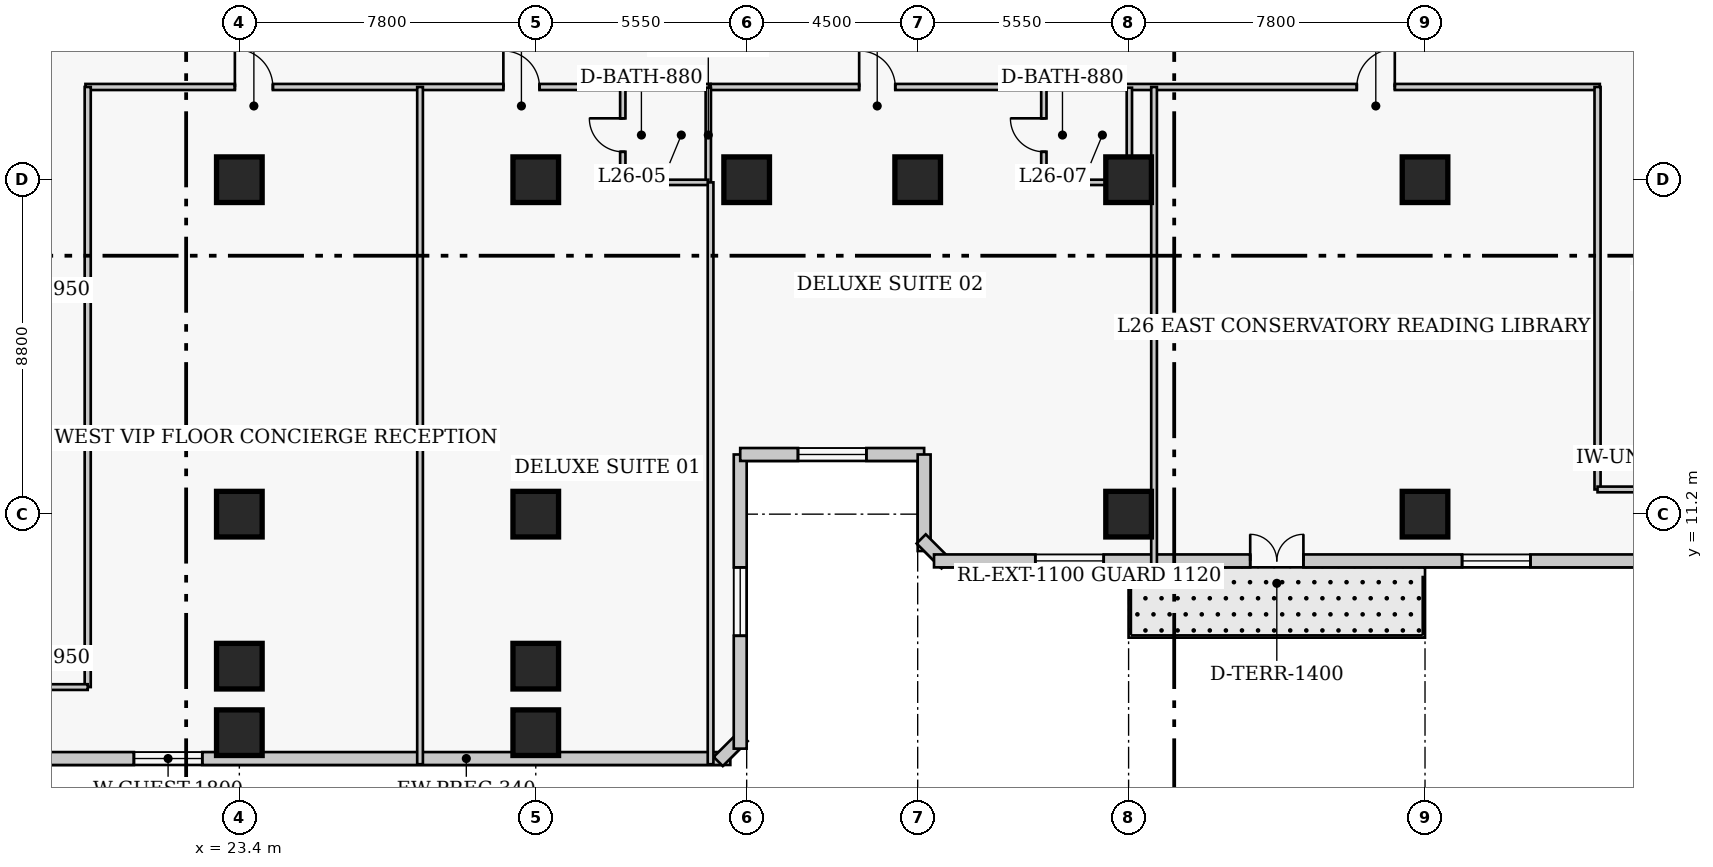
"""IFC4 building model, lengths in metres.
Left out: names, types, materials, properties, quantities, classifications, styles, units other than length and angle.
Written with IfcOpenShell. Run it as: python <this file> out.ifc"""

import sys

from ifc_helpers import new_model, si_unit, direction, frame, frame_2d, origin, origin_2d, place, context, subcontext, project, spatial, rectangle, extrude, element, fill, save


model = new_model("IFC4")
c1 = context("Model", 3, precision=1e-05, world=origin(), true_north=direction((0.0, 1.0)))
c2 = subcontext(c1, "Body", "Model", "MODEL_VIEW")
j1 = project(units=[si_unit("LENGTHUNIT", "METRE"), si_unit("PLANEANGLEUNIT", "RADIAN")], contexts=[c1])
p1 = place(None, origin())
s1 = spatial("IfcSite", under=j1, at=p1, CompositionType="ELEMENT")
p2 = place(p1, origin())
s2 = spatial("IfcBuilding", under=s1, at=p2, CompositionType="ELEMENT")
p3 = place(p2, frame((0.0, 0.0, 107.0)))
s3 = spatial("IfcBuildingStorey", under=s2, at=p3, CompositionType="ELEMENT", Elevation=107.0)
for number, where, z_axis, x_axis in (
    (1, (23.4, 11.2, 0.0), (0.0, 0.0, 1.0), (1.0, 0.0, 0.0)),
    (2, (23.4, 20.0, 0.0), (0.0, 0.0, 1.0), (1.0, 0.0, 0.0)),
    (3, (31.2, 11.2, 0.0), (0.0, 0.0, 1.0), (1.0, 0.0, 0.0)),
    (4, (31.2, 20.0, 0.0), (0.0, 0.0, 1.0), (1.0, 0.0, 0.0)),
    (5, (36.75, 20.0, 0.0), (0.0, 0.0, 1.0), (1.0, 0.0, 0.0)),
    (6, (41.25, 20.0, 0.0), (0.0, 0.0, 1.0), (1.0, 0.0, 0.0)),
    (7, (46.8, 11.2, 0.0), (0.0, 0.0, 1.0), (1.0, 0.0, 0.0)),
    (8, (46.8, 20.0, 0.0), (0.0, 0.0, 1.0), (1.0, 0.0, 0.0)),
    (9, (54.6, 11.2, 0.0), (0.0, 0.0, 1.0), (1.0, 0.0, 0.0)),
    (10, (54.6, 20.0, 0.0), (0.0, 0.0, 1.0), (1.0, 0.0, 0.0)),
    (11, (23.4, 7.2, 0.0), (0.0, 0.0, 1.0), (1.0, 0.0, 0.0)),
    (12, (31.2, 7.2, 0.0), (0.0, 0.0, 1.0), (1.0, 0.0, 0.0)),
    (13, (23.4, 5.45, 0.0), (0.0, 0.0, 1.0), (1.0, 0.0, 0.0)),
    (14, (31.2, 5.45, 0.0), (0.0, 0.0, 1.0), (1.0, 0.0, 0.0)),
):
    element("IfcColumn", number, at=place(p3, frame(where, z_axis=z_axis, x_axis=x_axis)), inside=s3, PredefinedType="COLUMN", context=c2, shape_type="SweptSolid", body=[
        extrude(rectangle(XDim=1.2, YDim=1.2, at=origin_2d()), origin(), (0.0, 0.0, 1.0), 3.8),
    ])
p4 = place(p3, frame((8.03, 4.77, 0.0), z_axis=(0.0, 0.0, 1.0), x_axis=(1.0, 0.0, 0.0)))
e15 = element("IfcWall", 15, at=p4, inside=s3, PredefinedType="SOLIDWALL", context=c2, shape_type="SweptSolid", body=[
    extrude(rectangle(XDim=28.29, YDim=0.34, at=frame_2d((14.145, 0.0))), origin(), (0.0, 0.0, 1.0), 3.54),
])
p5 = place(p4, frame((12.595, 0.0, 0.85)))
e16 = element("IfcOpeningElement", 16, at=p5, cuts=e15, PredefinedType="OPENING", context=c2, shape_type="SweptSolid", body=[
    extrude(rectangle(XDim=1.8, YDim=1.8, at=frame_2d((0.9, 0.9))), frame((0.0, 0.18, 0.0), z_axis=(0.0, -1.0, 0.0), x_axis=(1.0, 0.0, 0.0)), (0.0, 0.0, 1.0), 0.36),
])
p6 = place(p3, frame((36.001, 4.692, 0.0), z_axis=(0.0, 0.0, 1.0), x_axis=(0.707238225886, 0.706975312048, 0.0)))
e17 = element("IfcWall", 17, at=p6, inside=s3, PredefinedType="SOLIDWALL", context=c2, shape_type="SweptSolid", body=[
    extrude(rectangle(XDim=0.929, YDim=0.34, at=frame_2d((0.464, 0.0))), origin(), (0.0, 0.0, 1.0), 3.54),
])
p7 = place(p3, frame((36.58, 5.03, 0.0), z_axis=(0.0, 0.0, 1.0), x_axis=(0.0, 1.0, 0.0)))
e18 = element("IfcWall", 18, at=p7, inside=s3, PredefinedType="SOLIDWALL", context=c2, shape_type="SweptSolid", body=[
    extrude(rectangle(XDim=7.74, YDim=0.34, at=frame_2d((3.87, 0.0))), origin(), (0.0, 0.0, 1.0), 3.54),
])
p8 = place(p7, frame((2.97, 0.0, 0.85)))
e19 = element("IfcOpeningElement", 19, at=p8, cuts=e18, PredefinedType="OPENING", context=c2, shape_type="SweptSolid", body=[
    extrude(rectangle(XDim=1.8, YDim=1.8, at=frame_2d((0.9, 0.9))), frame((0.0, 0.18, 0.0), z_axis=(0.0, -1.0, 0.0), x_axis=(1.0, 0.0, 0.0)), (0.0, 0.0, 1.0), 0.36),
])
p9 = place(p3, frame((36.58, 12.77, 0.0), z_axis=(0.0, 0.0, 1.0), x_axis=(1.0, 0.0, 0.0)))
e20 = element("IfcWall", 20, at=p9, inside=s3, PredefinedType="SOLIDWALL", context=c2, shape_type="SweptSolid", body=[
    extrude(rectangle(XDim=4.84, YDim=0.34, at=frame_2d((2.42, 0.0))), origin(), (0.0, 0.0, 1.0), 3.54),
])
p10 = place(p9, frame((1.52, 0.0, 0.85)))
e21 = element("IfcOpeningElement", 21, at=p10, cuts=e20, PredefinedType="OPENING", context=c2, shape_type="SweptSolid", body=[
    extrude(rectangle(XDim=1.8, YDim=1.8, at=frame_2d((0.9, 0.9))), frame((0.0, 0.18, 0.0), z_axis=(0.0, -1.0, 0.0), x_axis=(1.0, 0.0, 0.0)), (0.0, 0.0, 1.0), 0.36),
])
p11 = place(p3, frame((41.42, 12.77, 0.0), z_axis=(0.0, 0.0, 1.0), x_axis=(0.0, -1.0, 0.0)))
e22 = element("IfcWall", 22, at=p11, inside=s3, PredefinedType="SOLIDWALL", context=c2, shape_type="SweptSolid", body=[
    extrude(rectangle(XDim=2.54, YDim=0.34, at=frame_2d((1.27, 0.0))), origin(), (0.0, 0.0, 1.0), 3.54),
])
p12 = place(p3, frame((41.342, 10.549, 0.0), z_axis=(0.0, 0.0, 1.0), x_axis=(0.707106781187, -0.707106781187, 0.0)))
e23 = element("IfcWall", 23, at=p12, inside=s3, PredefinedType="SOLIDWALL", context=c2, shape_type="SweptSolid", body=[
    extrude(rectangle(XDim=0.929, YDim=0.34, at=frame_2d((0.464, 0.0))), origin(), (0.0, 0.0, 1.0), 3.54),
])
p13 = place(p3, frame((41.68, 9.97, 0.0), z_axis=(0.0, 0.0, 1.0), x_axis=(1.0, 0.0, 0.0)))
e24 = element("IfcWall", 24, at=p13, inside=s3, PredefinedType="SOLIDWALL", context=c2, shape_type="SweptSolid", body=[
    extrude(rectangle(XDim=28.29, YDim=0.34, at=frame_2d((14.145, 0.0))), origin(), (0.0, 0.0, 1.0), 3.54),
])
p14 = place(p13, frame((8.32, 0.0, 0.0)))
e25 = element("IfcOpeningElement", 25, at=p14, cuts=e24, PredefinedType="OPENING", context=c2, shape_type="SweptSolid", body=[
    extrude(rectangle(XDim=1.4, YDim=2.15, at=frame_2d((0.7, 1.075))), frame((0.0, 0.18, 0.0), z_axis=(0.0, -1.0, 0.0), x_axis=(1.0, 0.0, 0.0)), (0.0, 0.0, 1.0), 0.36),
])
p15 = place(p13, frame((2.665, 0.0, 0.85)))
e26 = element("IfcOpeningElement", 26, at=p15, cuts=e24, PredefinedType="OPENING", context=c2, shape_type="SweptSolid", body=[
    extrude(rectangle(XDim=1.8, YDim=1.8, at=frame_2d((0.9, 0.9))), frame((0.0, 0.18, 0.0), z_axis=(0.0, -1.0, 0.0), x_axis=(1.0, 0.0, 0.0)), (0.0, 0.0, 1.0), 0.36),
])
p16 = place(p13, frame((13.895, 0.0, 0.85)))
e27 = element("IfcOpeningElement", 27, at=p16, cuts=e24, PredefinedType="OPENING", context=c2, shape_type="SweptSolid", body=[
    extrude(rectangle(XDim=1.8, YDim=1.8, at=frame_2d((0.9, 0.9))), frame((0.0, 0.18, 0.0), z_axis=(0.0, -1.0, 0.0), x_axis=(1.0, 0.0, 0.0)), (0.0, 0.0, 1.0), 0.36),
])
p17 = place(p3, frame((19.35, 22.44, 0.0), z_axis=(0.0, 0.0, 1.0), x_axis=(1.0, 0.0, 0.0)))
e28 = element("IfcWall", 28, at=p17, inside=s3, PredefinedType="PARTITIONING", context=c2, shape_type="SweptSolid", body=[
    extrude(rectangle(XDim=16.45, YDim=0.16, at=frame_2d((8.225, 0.0))), origin(), (0.0, 0.0, 1.0), 3.54),
])
p18 = place(p17, frame((3.933, 0.0, 0.0)))
e29 = element("IfcOpeningElement", 29, at=p18, cuts=e28, PredefinedType="OPENING", context=c2, shape_type="SweptSolid", body=[
    extrude(rectangle(XDim=1.0, YDim=2.15, at=frame_2d((0.5, 1.075))), frame((0.0, 0.09, 0.0), z_axis=(0.0, -1.0, 0.0), x_axis=(1.0, 0.0, 0.0)), (0.0, 0.0, 1.0), 0.18),
])
p19 = place(p17, frame((10.998, 0.0, 0.0)))
e30 = element("IfcOpeningElement", 30, at=p19, cuts=e28, PredefinedType="OPENING", context=c2, shape_type="SweptSolid", body=[
    extrude(rectangle(XDim=0.95, YDim=2.1, at=frame_2d((0.475, 1.05))), frame((0.0, 0.09, 0.0), z_axis=(0.0, -1.0, 0.0), x_axis=(1.0, 0.0, 0.0)), (0.0, 0.0, 1.0), 0.18),
])
p20 = place(p3, frame((35.8, 22.44, 0.0), z_axis=(0.0, 0.0, 1.0), x_axis=(1.0, 0.0, 0.0)))
e31 = element("IfcWall", 31, at=p20, inside=s3, PredefinedType="PARTITIONING", context=c2, shape_type="SweptSolid", body=[
    extrude(rectangle(XDim=23.4, YDim=0.16, at=frame_2d((11.7, 0.0))), origin(), (0.0, 0.0, 1.0), 3.54),
])
p21 = place(p20, frame((3.91, 0.0, 0.0)))
e32 = element("IfcOpeningElement", 32, at=p21, cuts=e31, PredefinedType="OPENING", context=c2, shape_type="SweptSolid", body=[
    extrude(rectangle(XDim=0.95, YDim=2.1, at=frame_2d((0.475, 1.05))), frame((0.0, 0.09, 0.0), z_axis=(0.0, -1.0, 0.0), x_axis=(1.0, 0.0, 0.0)), (0.0, 0.0, 1.0), 0.18),
])
p22 = place(p20, frame((17.005, 0.0, 0.0)))
e33 = element("IfcOpeningElement", 33, at=p22, cuts=e31, PredefinedType="OPENING", context=c2, shape_type="SweptSolid", body=[
    extrude(rectangle(XDim=1.0, YDim=2.15, at=frame_2d((0.5, 1.075))), frame((0.0, 0.09, 0.0), z_axis=(0.0, -1.0, 0.0), x_axis=(1.0, 0.0, 0.0)), (0.0, 0.0, 1.0), 0.18),
])
p23 = place(p3, frame((19.41, 6.65, 0.0), z_axis=(0.0, 0.0, 1.0), x_axis=(0.0, 1.0, 0.0)))
e34 = element("IfcWall", 34, at=p23, inside=s3, PredefinedType="PARTITIONING", context=c2, shape_type="SweptSolid", body=[
    extrude(rectangle(XDim=15.79, YDim=0.16, at=frame_2d((7.895, 0.0))), origin(), (0.0, 0.0, 1.0), 3.083),
])
p24 = place(p3, frame((59.14, 11.85, 0.0), z_axis=(0.0, 0.0, 1.0), x_axis=(0.0, 1.0, 0.0)))
e35 = element("IfcWall", 35, at=p24, inside=s3, PredefinedType="PARTITIONING", context=c2, shape_type="SweptSolid", body=[
    extrude(rectangle(XDim=10.59, YDim=0.16, at=frame_2d((5.295, 0.0))), origin(), (0.0, 0.0, 1.0), 3.54),
])
p25 = place(p3, frame((59.14, 11.85, 0.0), z_axis=(0.0, 0.0, 1.0), x_axis=(1.0, 0.0, 0.0)))
e36 = element("IfcWall", 36, at=p25, inside=s3, PredefinedType="PARTITIONING", context=c2, shape_type="SweptSolid", body=[
    extrude(rectangle(XDim=2.22, YDim=0.15, at=frame_2d((1.11, 0.0))), origin(), (0.0, 0.0, 1.0), 3.54),
])
p26 = place(p3, frame((17.19, 6.65, 0.0), z_axis=(0.0, 0.0, 1.0), x_axis=(1.0, 0.0, 0.0)))
e37 = element("IfcWall", 37, at=p26, inside=s3, PredefinedType="PARTITIONING", context=c2, shape_type="SweptSolid", body=[
    extrude(rectangle(XDim=2.22, YDim=0.15, at=frame_2d((1.11, 0.0))), origin(), (0.0, 0.0, 1.0), 3.54),
])
p27 = place(p3, frame((28.155, 4.62, 0.0), z_axis=(0.0, 0.0, 1.0), x_axis=(0.0, 1.0, 0.0)))
e38 = element("IfcWall", 38, at=p27, inside=s3, PredefinedType="PARTITIONING", context=c2, shape_type="SweptSolid", body=[
    extrude(rectangle(XDim=17.82, YDim=0.15, at=frame_2d((8.91, 0.0))), origin(), (0.0, 0.0, 1.0), 3.54),
])
p28 = place(p3, frame((33.49, 19.93, 0.0), z_axis=(0.0, 0.0, 1.0), x_axis=(0.0, 1.0, 0.0)))
e39 = element("IfcWall", 39, at=p28, inside=s3, PredefinedType="PLUMBINGWALL", context=c2, shape_type="SweptSolid", body=[
    extrude(rectangle(XDim=2.49, YDim=0.14, at=frame_2d((1.245, 0.0))), origin(), (0.0, 0.0, 1.0), 3.54),
])
p29 = place(p28, frame((0.805, 0.0, 0.0)))
e40 = element("IfcOpeningElement", 40, at=p29, cuts=e39, PredefinedType="OPENING", context=c2, shape_type="SweptSolid", body=[
    extrude(rectangle(XDim=0.88, YDim=2.05, at=frame_2d((0.44, 1.025))), frame((0.0, 0.08, 0.0), z_axis=(0.0, -1.0, 0.0), x_axis=(1.0, 0.0, 0.0)), (0.0, 0.0, 1.0), 0.16),
])
p30 = place(p3, frame((35.74, 19.93, 0.0), z_axis=(0.0, 0.0, 1.0), x_axis=(0.0, 1.0, 0.0)))
e41 = element("IfcWall", 41, at=p30, inside=s3, PredefinedType="PLUMBINGWALL", context=c2, shape_type="SweptSolid", body=[
    extrude(rectangle(XDim=2.49, YDim=0.14, at=frame_2d((1.245, 0.0))), origin(), (0.0, 0.0, 1.0), 3.54),
])
p31 = place(p3, frame((33.49, 19.93, 0.0), z_axis=(0.0, 0.0, 1.0), x_axis=(1.0, 0.0, 0.0)))
e42 = element("IfcWall", 42, at=p31, inside=s3, PredefinedType="PLUMBINGWALL", context=c2, shape_type="SweptSolid", body=[
    extrude(rectangle(XDim=2.25, YDim=0.14, at=frame_2d((1.125, 0.0))), origin(), (0.0, 0.0, 1.0), 2.679),
])
p32 = place(p3, frame((35.8, 4.62, 0.0), z_axis=(0.0, 0.0, 1.0), x_axis=(0.0, 1.0, 0.0)))
e43 = element("IfcWall", 43, at=p32, inside=s3, PredefinedType="PARTITIONING", context=c2, shape_type="SweptSolid", body=[
    extrude(rectangle(XDim=15.31, YDim=0.15, at=frame_2d((7.655, 0.0))), origin(), (0.0, 0.0, 1.0), 3.54),
])
p33 = place(p3, frame((44.57, 19.93, 0.0), z_axis=(0.0, 0.0, 1.0), x_axis=(0.0, 1.0, 0.0)))
e44 = element("IfcWall", 44, at=p33, inside=s3, PredefinedType="PLUMBINGWALL", context=c2, shape_type="SweptSolid", body=[
    extrude(rectangle(XDim=2.49, YDim=0.14, at=frame_2d((1.245, 0.0))), origin(), (0.0, 0.0, 1.0), 3.54),
])
p34 = place(p33, frame((0.805, 0.0, 0.0)))
e45 = element("IfcOpeningElement", 45, at=p34, cuts=e44, PredefinedType="OPENING", context=c2, shape_type="SweptSolid", body=[
    extrude(rectangle(XDim=0.88, YDim=2.05, at=frame_2d((0.44, 1.025))), frame((0.0, 0.08, 0.0), z_axis=(0.0, -1.0, 0.0), x_axis=(1.0, 0.0, 0.0)), (0.0, 0.0, 1.0), 0.16),
])
p35 = place(p3, frame((46.82, 19.93, 0.0), z_axis=(0.0, 0.0, 1.0), x_axis=(0.0, 1.0, 0.0)))
e46 = element("IfcWall", 46, at=p35, inside=s3, PredefinedType="PLUMBINGWALL", context=c2, shape_type="SweptSolid", body=[
    extrude(rectangle(XDim=2.49, YDim=0.14, at=frame_2d((1.245, 0.0))), origin(), (0.0, 0.0, 1.0), 2.679),
])
p36 = place(p3, frame((44.57, 19.93, 0.0), z_axis=(0.0, 0.0, 1.0), x_axis=(1.0, 0.0, 0.0)))
e47 = element("IfcWall", 47, at=p36, inside=s3, PredefinedType="PLUMBINGWALL", context=c2, shape_type="SweptSolid", body=[
    extrude(rectangle(XDim=2.25, YDim=0.14, at=frame_2d((1.125, 0.0))), origin(), (0.0, 0.0, 1.0), 2.679),
])
p37 = place(p3, frame((47.47, 9.82, 0.0), z_axis=(0.0, 0.0, 1.0), x_axis=(0.0, 1.0, 0.0)))
e48 = element("IfcWall", 48, at=p37, inside=s3, PredefinedType="PARTITIONING", context=c2, shape_type="SweptSolid", body=[
    extrude(rectangle(XDim=12.62, YDim=0.15, at=frame_2d((6.31, 0.0))), origin(), (0.0, 0.0, 1.0), 3.54),
])
p38 = place(p5, origin())
e49 = element("IfcWindow", 49, at=p38, inside=s3, PartitioningType="SINGLE_PANEL", PredefinedType="WINDOW", context=c2, shape_type="SweptSolid", body=[
    extrude(rectangle(XDim=1.8, YDim=1.8, at=frame_2d((0.9, 0.9))), frame((0.0, 0.03, 0.0), z_axis=(0.0, -1.0, 0.0), x_axis=(1.0, 0.0, 0.0)), (0.0, 0.0, 1.0), 0.06),
])
fill(e16, e49)
p39 = place(p8, origin())
e50 = element("IfcWindow", 50, at=p39, inside=s3, PartitioningType="SINGLE_PANEL", PredefinedType="WINDOW", context=c2, shape_type="SweptSolid", body=[
    extrude(rectangle(XDim=1.8, YDim=1.8, at=frame_2d((0.9, 0.9))), frame((0.0, 0.03, 0.0), z_axis=(0.0, -1.0, 0.0), x_axis=(1.0, 0.0, 0.0)), (0.0, 0.0, 1.0), 0.06),
])
fill(e19, e50)
p40 = place(p10, origin())
e51 = element("IfcWindow", 51, at=p40, inside=s3, PartitioningType="SINGLE_PANEL", PredefinedType="WINDOW", context=c2, shape_type="SweptSolid", body=[
    extrude(rectangle(XDim=1.8, YDim=1.8, at=frame_2d((0.9, 0.9))), frame((0.0, 0.03, 0.0), z_axis=(0.0, -1.0, 0.0), x_axis=(1.0, 0.0, 0.0)), (0.0, 0.0, 1.0), 0.06),
])
fill(e21, e51)
p41 = place(p14, origin())
e52 = element("IfcDoor", 52, at=p41, inside=s3, OperationType="DOUBLE_DOOR_SINGLE_SWING", PredefinedType="DOOR", context=c2, shape_type="SweptSolid", body=[
    extrude(rectangle(XDim=1.4, YDim=2.15, at=frame_2d((0.7, 1.075))), frame((0.0, 0.025, 0.0), z_axis=(0.0, -1.0, 0.0), x_axis=(1.0, 0.0, 0.0)), (0.0, 0.0, 1.0), 0.05),
])
fill(e25, e52)
p42 = place(p15, origin())
e53 = element("IfcWindow", 53, at=p42, inside=s3, PartitioningType="SINGLE_PANEL", PredefinedType="WINDOW", context=c2, shape_type="SweptSolid", body=[
    extrude(rectangle(XDim=1.8, YDim=1.8, at=frame_2d((0.9, 0.9))), frame((0.0, 0.03, 0.0), z_axis=(0.0, -1.0, 0.0), x_axis=(1.0, 0.0, 0.0)), (0.0, 0.0, 1.0), 0.06),
])
fill(e26, e53)
p43 = place(p16, origin())
e54 = element("IfcWindow", 54, at=p43, inside=s3, PartitioningType="SINGLE_PANEL", PredefinedType="WINDOW", context=c2, shape_type="SweptSolid", body=[
    extrude(rectangle(XDim=1.8, YDim=1.8, at=frame_2d((0.9, 0.9))), frame((0.0, 0.03, 0.0), z_axis=(0.0, -1.0, 0.0), x_axis=(1.0, 0.0, 0.0)), (0.0, 0.0, 1.0), 0.06),
])
fill(e27, e54)
p44 = place(p18, origin())
e55 = element("IfcDoor", 55, at=p44, inside=s3, OperationType="SINGLE_SWING_LEFT", PredefinedType="DOOR", context=c2, shape_type="SweptSolid", body=[
    extrude(rectangle(XDim=1.0, YDim=2.15, at=frame_2d((0.5, 1.075))), frame((0.0, 0.025, 0.0), z_axis=(0.0, -1.0, 0.0), x_axis=(1.0, 0.0, 0.0)), (0.0, 0.0, 1.0), 0.05),
])
fill(e29, e55)
p45 = place(p29, origin())
e56 = element("IfcDoor", 56, at=p45, inside=s3, OperationType="SINGLE_SWING_RIGHT", PredefinedType="DOOR", context=c2, shape_type="SweptSolid", body=[
    extrude(rectangle(XDim=0.88, YDim=2.05, at=frame_2d((0.44, 1.025))), frame((0.0, 0.025, 0.0), z_axis=(0.0, -1.0, 0.0), x_axis=(1.0, 0.0, 0.0)), (0.0, 0.0, 1.0), 0.05),
])
fill(e40, e56)
p46 = place(p19, origin())
e57 = element("IfcDoor", 57, at=p46, inside=s3, OperationType="SINGLE_SWING_LEFT", PredefinedType="DOOR", context=c2, shape_type="SweptSolid", body=[
    extrude(rectangle(XDim=0.95, YDim=2.1, at=frame_2d((0.475, 1.05))), frame((0.0, 0.025, 0.0), z_axis=(0.0, -1.0, 0.0), x_axis=(1.0, 0.0, 0.0)), (0.0, 0.0, 1.0), 0.05),
])
fill(e30, e57)
p47 = place(p34, origin())
e58 = element("IfcDoor", 58, at=p47, inside=s3, OperationType="SINGLE_SWING_RIGHT", PredefinedType="DOOR", context=c2, shape_type="SweptSolid", body=[
    extrude(rectangle(XDim=0.88, YDim=2.05, at=frame_2d((0.44, 1.025))), frame((0.0, 0.025, 0.0), z_axis=(0.0, -1.0, 0.0), x_axis=(1.0, 0.0, 0.0)), (0.0, 0.0, 1.0), 0.05),
])
fill(e45, e58)
p48 = place(p21, origin())
e59 = element("IfcDoor", 59, at=p48, inside=s3, OperationType="SINGLE_SWING_LEFT", PredefinedType="DOOR", context=c2, shape_type="SweptSolid", body=[
    extrude(rectangle(XDim=0.95, YDim=2.1, at=frame_2d((0.475, 1.05))), frame((0.0, 0.025, 0.0), z_axis=(0.0, -1.0, 0.0), x_axis=(1.0, 0.0, 0.0)), (0.0, 0.0, 1.0), 0.05),
])
fill(e32, e59)
p49 = place(p22, origin())
e60 = element("IfcDoor", 60, at=p49, inside=s3, OperationType="SINGLE_SWING_RIGHT", PredefinedType="DOOR", context=c2, shape_type="SweptSolid", body=[
    extrude(rectangle(XDim=1.0, YDim=2.15, at=frame_2d((0.5, 1.075))), frame((0.0, 0.025, 0.0), z_axis=(0.0, -1.0, 0.0), x_axis=(1.0, 0.0, 0.0)), (0.0, 0.0, 1.0), 0.05),
])
fill(e33, e60)
save(model, sys.argv[1])
